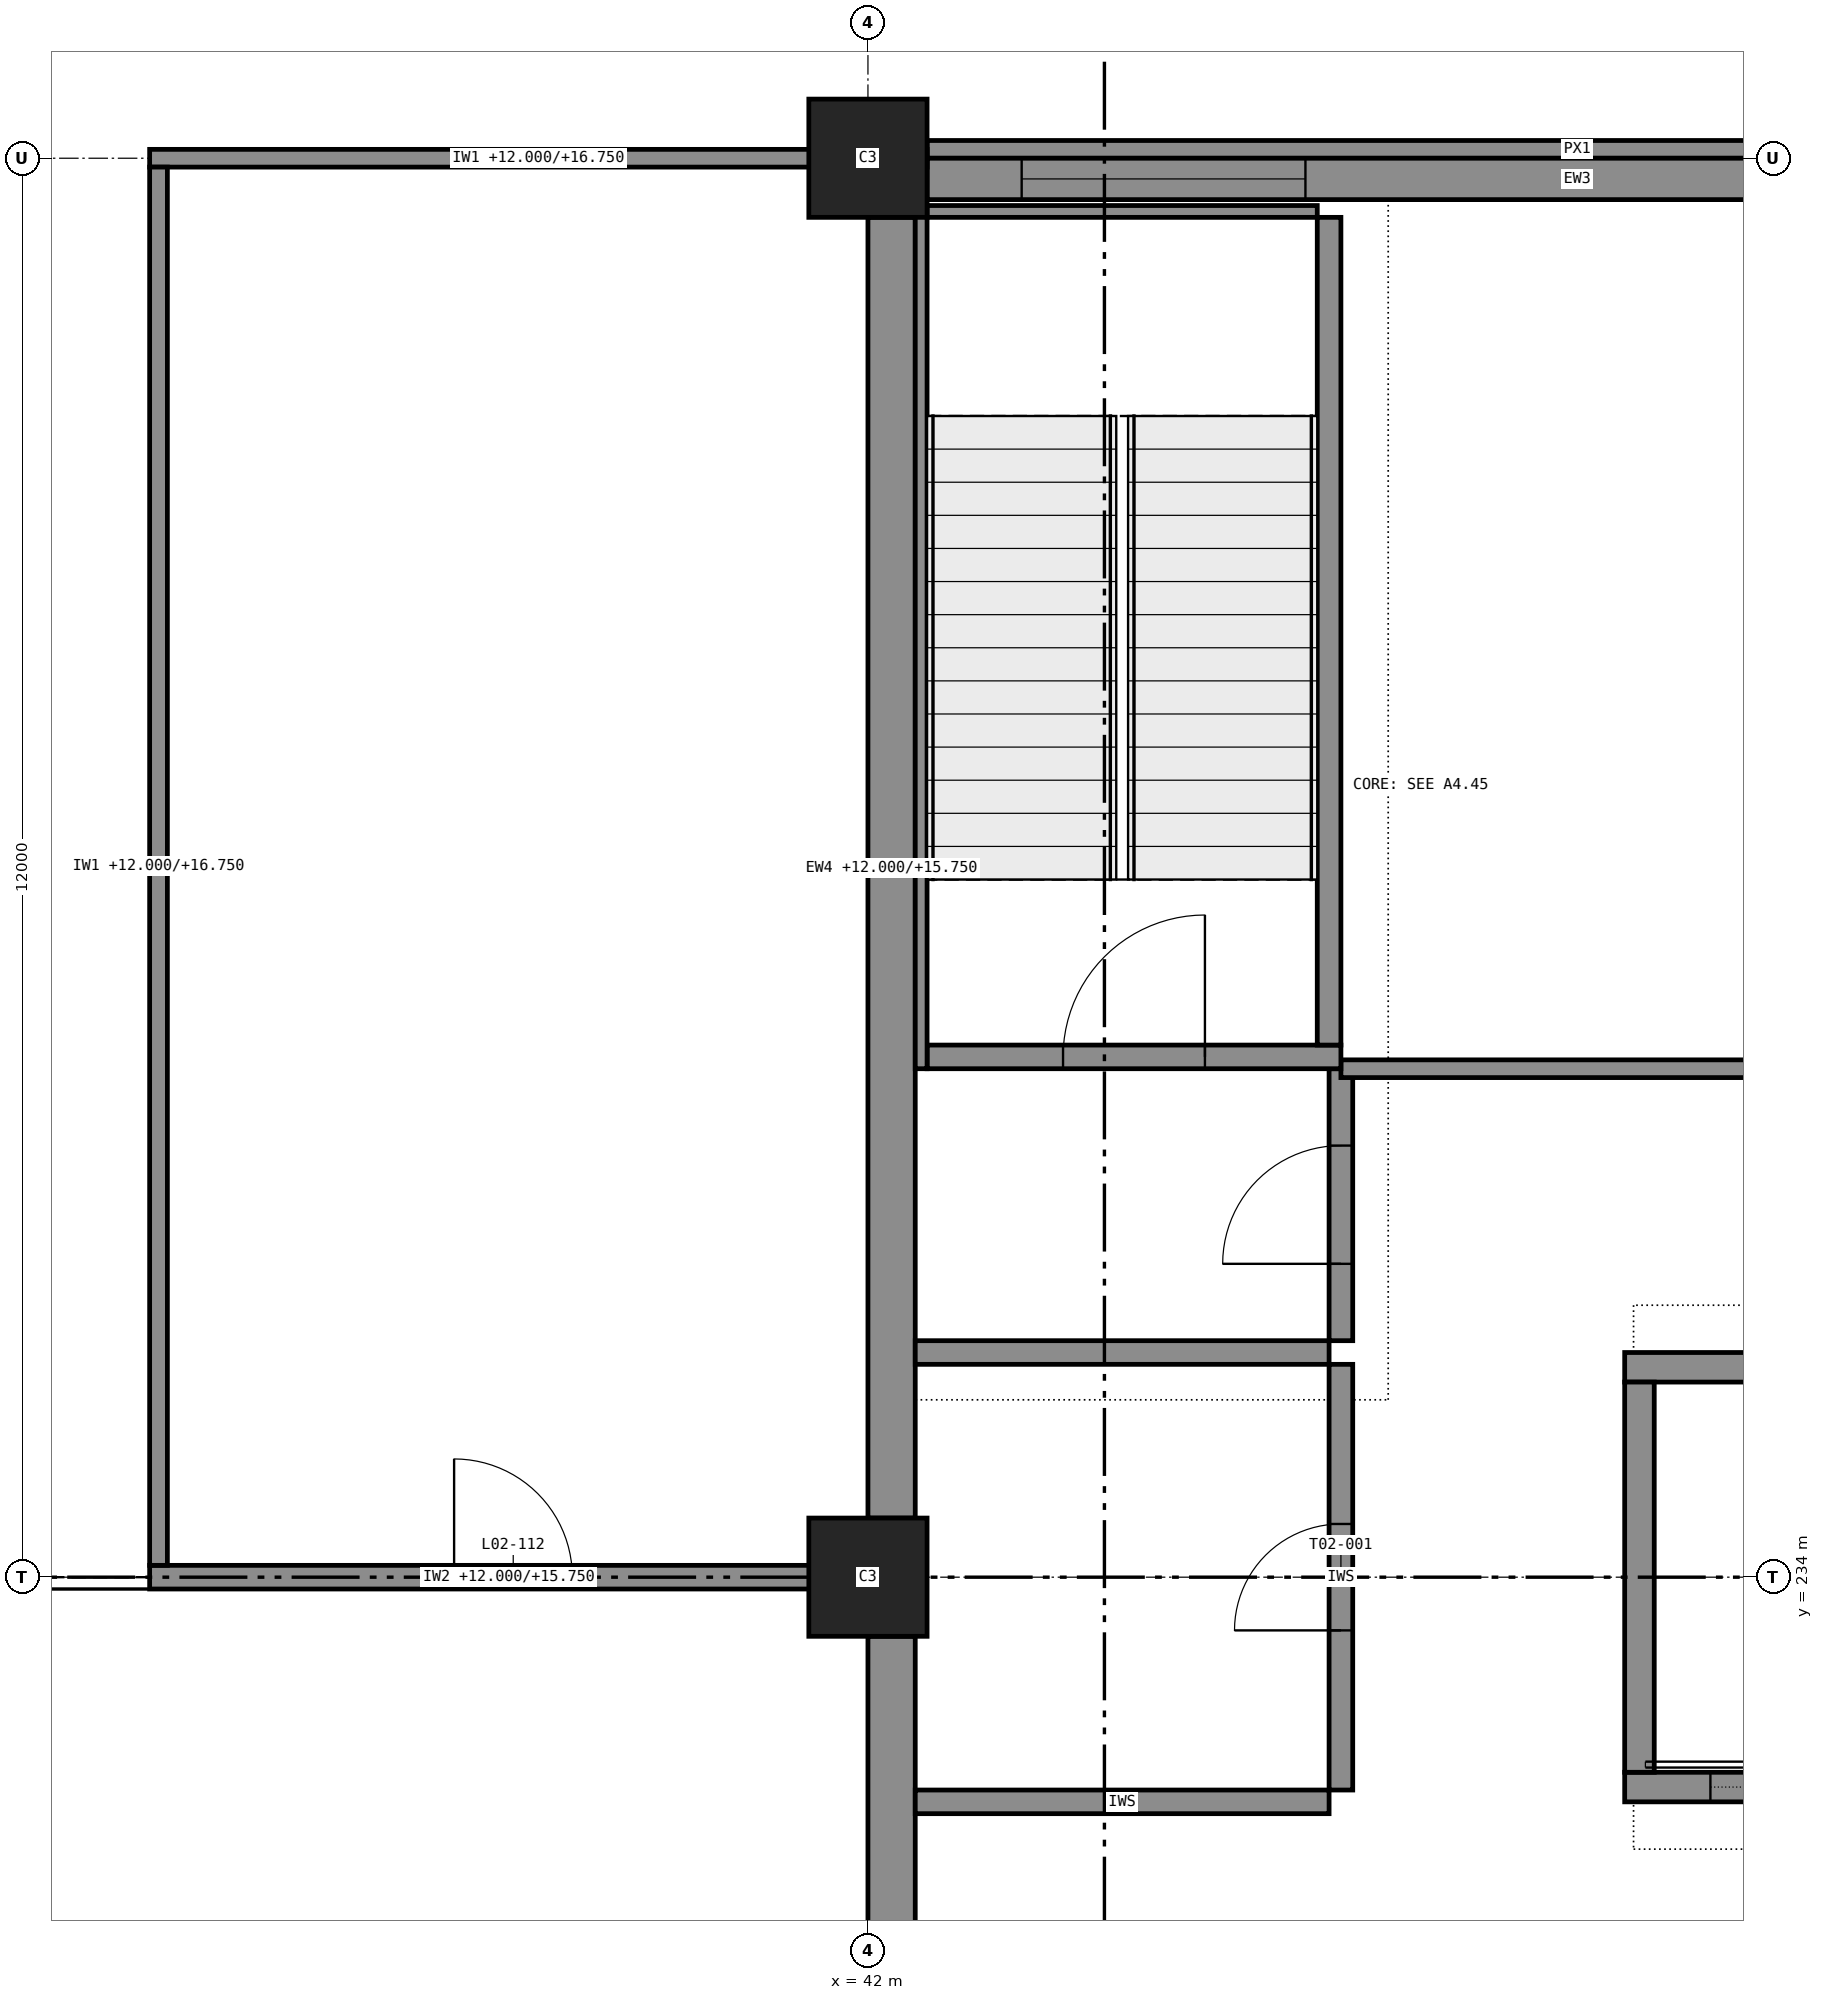
"""IFC4 building model, lengths in metres.
Left out: names, types, materials, properties, quantities, classifications, styles, units other than length and angle.
Written with IfcOpenShell. Run it as: python <this file> out.ifc"""

import sys

from ifc_helpers import new_model, si_unit, direction, frame, frame_2d, origin, origin_2d, place, context, subcontext, project, spatial, rectangle, extrude, element, fill, save


model = new_model("IFC4")
c1 = context("Model", 3, precision=1e-05, world=origin(), true_north=direction((0.0, 1.0)))
c2 = subcontext(c1, "Body", "Model", "MODEL_VIEW")
j1 = project(units=[si_unit("LENGTHUNIT", "METRE"), si_unit("PLANEANGLEUNIT", "RADIAN")], contexts=[c1])
p1 = place(None, origin())
s1 = spatial("IfcSite", under=j1, at=p1, CompositionType="ELEMENT")
p2 = place(p1, origin())
s2 = spatial("IfcBuilding", under=s1, at=p2, CompositionType="ELEMENT")
p3 = place(p2, frame((0.0, 0.0, 12.0)))
s3 = spatial("IfcBuildingStorey", under=s2, at=p3, CompositionType="ELEMENT", Elevation=12.0)
for number, where, z_axis, x_axis in (
    (1, (42.0, 234.0, 0.0), (0.0, 0.0, 1.0), (1.0, 0.0, 0.0)),
    (2, (42.0, 246.0, 0.0), (0.0, 0.0, 1.0), (1.0, 0.0, 0.0)),
):
    element("IfcColumn", number, at=place(p3, frame(where, z_axis=z_axis, x_axis=x_axis)), inside=s3, PredefinedType="COLUMN", context=c2, shape_type="SweptSolid", body=[
        extrude(rectangle(XDim=1.0, YDim=1.0, at=origin_2d()), origin(), (0.0, 0.0, 1.0), 5.0),
    ])
p4 = place(p3, frame((48.4, 232.225, 0.0), z_axis=(0.0, 0.0, 1.0), x_axis=(1.0, 0.0, 0.0)))
e3 = element("IfcWall", 3, at=p4, inside=s3, PredefinedType="SHEAR", context=c2, shape_type="SweptSolid", body=[
    extrude(rectangle(XDim=2.55, YDim=0.25, at=frame_2d((1.275, 0.0))), origin(), (0.0, 0.0, 1.0), 5.0),
])
p5 = place(p4, frame((0.725, 0.0, 0.0)))
e4 = element("IfcOpeningElement", 4, at=p5, cuts=e3, PredefinedType="OPENING", context=c2, shape_type="SweptSolid", body=[
    extrude(rectangle(XDim=1.1, YDim=2.1, at=frame_2d((0.55, 1.05))), frame((0.0, 0.135, 0.0), z_axis=(0.0, -1.0, 0.0), x_axis=(1.0, 0.0, 0.0)), (0.0, 0.0, 1.0), 0.27),
])
p6 = place(p3, frame((48.4, 235.775, 0.0), z_axis=(0.0, 0.0, 1.0), x_axis=(1.0, 0.0, 0.0)))
e5 = element("IfcWall", 5, at=p6, inside=s3, PredefinedType="SHEAR", context=c2, shape_type="SweptSolid", body=[
    extrude(rectangle(XDim=2.55, YDim=0.25, at=frame_2d((1.275, 0.0))), origin(), (0.0, 0.0, 1.0), 5.0),
])
p7 = place(p3, frame((48.525, 232.35, 0.0), z_axis=(0.0, 0.0, 1.0), x_axis=(0.0, 1.0, 0.0)))
e6 = element("IfcWall", 6, at=p7, inside=s3, PredefinedType="SHEAR", context=c2, shape_type="SweptSolid", body=[
    extrude(rectangle(XDim=3.3, YDim=0.25, at=frame_2d((1.65, 0.0))), origin(), (0.0, 0.0, 1.0), 5.0),
])
p8 = place(p3, frame((42.5, 238.4, 0.0), z_axis=(0.0, 0.0, 1.0), x_axis=(1.0, 0.0, 0.0)))
e7 = element("IfcWall", 7, at=p8, inside=s3, PredefinedType="SHEAR", context=c2, shape_type="SweptSolid", body=[
    extrude(rectangle(XDim=3.5, YDim=0.2, at=frame_2d((1.75, 0.0))), origin(), (0.0, 0.0, 1.0), 5.0),
])
p9 = place(p8, frame((1.15, 0.0, 0.0)))
e8 = element("IfcOpeningElement", 8, at=p9, cuts=e7, PredefinedType="OPENING", context=c2, shape_type="SweptSolid", body=[
    extrude(rectangle(XDim=1.2, YDim=2.1, at=frame_2d((0.6, 1.05))), frame((0.0, 0.11, 0.0), z_axis=(0.0, -1.0, 0.0), x_axis=(1.0, 0.0, 0.0)), (0.0, 0.0, 1.0), 0.22),
])
p10 = place(p3, frame((45.9, 238.5, 0.0), z_axis=(0.0, 0.0, 1.0), x_axis=(0.0, 1.0, 0.0)))
e9 = element("IfcWall", 9, at=p10, inside=s3, PredefinedType="SHEAR", context=c2, shape_type="SweptSolid", body=[
    extrude(rectangle(XDim=7.0, YDim=0.2, at=frame_2d((3.5, 0.0))), origin(), (0.0, 0.0, 1.0), 5.0),
])
p11 = place(p3, frame((42.45, 238.3, 0.0), z_axis=(0.0, 0.0, 1.0), x_axis=(0.0, 1.0, 0.0)))
e10 = element("IfcWall", 10, at=p11, inside=s3, PredefinedType="SHEAR", context=c2, shape_type="SweptSolid", body=[
    extrude(rectangle(XDim=7.3, YDim=0.1, at=frame_2d((3.65, 0.0))), origin(), (0.0, 0.0, 1.0), 4.75),
])
p12 = place(p3, frame((42.5, 245.55, 0.0), z_axis=(0.0, 0.0, 1.0), x_axis=(1.0, 0.0, 0.0)))
e11 = element("IfcWall", 11, at=p12, inside=s3, PredefinedType="SHEAR", context=c2, shape_type="SweptSolid", body=[
    extrude(rectangle(XDim=3.3, YDim=0.1, at=frame_2d((1.65, 0.0))), origin(), (0.0, 0.0, 1.0), 4.75),
])
p13 = place(p3, frame((53.5, 245.825, 0.0), z_axis=(0.0, 0.0, 1.0), x_axis=(-1.0, 0.0, 0.0)))
e12 = element("IfcWall", 12, at=p13, inside=s3, PredefinedType="STANDARD", context=c2, shape_type="SweptSolid", body=[
    extrude(rectangle(XDim=11.0, YDim=0.35, at=frame_2d((5.5, 0.0))), origin(), (0.0, 0.0, 1.0), 3.75),
])
p14 = place(p13, frame((1.3, 0.0, 0.6)))
e13 = element("IfcOpeningElement", 13, at=p14, cuts=e12, PredefinedType="OPENING", context=c2, shape_type="SweptSolid", body=[
    extrude(rectangle(XDim=2.4, YDim=2.4, at=frame_2d((1.2, 1.2))), frame((0.0, 0.185, 0.0), z_axis=(0.0, -1.0, 0.0), x_axis=(1.0, 0.0, 0.0)), (0.0, 0.0, 1.0), 0.37),
])
p15 = place(p13, frame((7.8, 0.0, 0.6)))
e14 = element("IfcOpeningElement", 14, at=p15, cuts=e12, PredefinedType="OPENING", context=c2, shape_type="SweptSolid", body=[
    extrude(rectangle(XDim=2.4, YDim=2.4, at=frame_2d((1.2, 1.2))), frame((0.0, 0.185, 0.0), z_axis=(0.0, -1.0, 0.0), x_axis=(1.0, 0.0, 0.0)), (0.0, 0.0, 1.0), 0.37),
])
p16 = place(p3, frame((53.5, 246.075, 4.75), z_axis=(0.0, 0.0, 1.0), x_axis=(-1.0, 0.0, 0.0)))
e15 = element("IfcWall", 15, at=p16, inside=s3, PredefinedType="STANDARD", context=c2, shape_type="SweptSolid", body=[
    extrude(rectangle(XDim=11.0, YDim=0.15, at=frame_2d((5.5, 0.0))), origin(), (0.0, 0.0, 1.0), 0.25),
])
for number, where, z_axis, x_axis in (
    (16, (42.2, 245.5, 0.0), (0.0, 0.0, 1.0), (0.0, -1.0, 0.0)),
    (17, (42.2, 233.5, 0.0), (0.0, 0.0, 1.0), (0.0, -1.0, 0.0)),
):
    element("IfcWall", number, at=place(p3, frame(where, z_axis=z_axis, x_axis=x_axis)), inside=s3, PredefinedType="SOLIDWALL", context=c2, shape_type="SweptSolid", body=[
        extrude(rectangle(XDim=11.0, YDim=0.4, at=frame_2d((5.5, 0.0))), origin(), (0.0, 0.0, 1.0), 3.75),
    ])
p17 = place(p3, frame((35.925, 234.0, 0.0), z_axis=(0.0, 0.0, 1.0), x_axis=(1.0, 0.0, 0.0)))
e18 = element("IfcWall", 18, at=p17, inside=s3, PredefinedType="PARTITIONING", context=c2, shape_type="SweptSolid", body=[
    extrude(rectangle(XDim=6.075, YDim=0.2, at=frame_2d((3.038, 0.0))), origin(), (0.0, 0.0, 1.0), 3.75),
])
p18 = place(p17, frame((2.575, 0.0, 0.0)))
e19 = element("IfcOpeningElement", 19, at=p18, cuts=e18, PredefinedType="OPENING", context=c2, shape_type="SweptSolid", body=[
    extrude(rectangle(XDim=1.0, YDim=2.1, at=frame_2d((0.5, 1.05))), frame((0.0, 0.11, 0.0), z_axis=(0.0, -1.0, 0.0), x_axis=(1.0, 0.0, 0.0)), (0.0, 0.0, 1.0), 0.22),
])
p19 = place(p3, frame((35.925, 246.0, 0.0), z_axis=(0.0, 0.0, 1.0), x_axis=(1.0, 0.0, 0.0)))
e20 = element("IfcWall", 20, at=p19, inside=s3, PredefinedType="PARTITIONING", context=c2, shape_type="SweptSolid", body=[
    extrude(rectangle(XDim=6.575, YDim=0.15, at=frame_2d((3.288, 0.0))), origin(), (0.0, 0.0, 1.0), 4.75),
])
p20 = place(p3, frame((36.0, 234.1, 0.0), z_axis=(0.0, 0.0, 1.0), x_axis=(0.0, 1.0, 0.0)))
e21 = element("IfcWall", 21, at=p20, inside=s3, PredefinedType="PARTITIONING", context=c2, shape_type="SweptSolid", body=[
    extrude(rectangle(XDim=11.825, YDim=0.15, at=frame_2d((5.913, 0.0))), origin(), (0.0, 0.0, 1.0), 4.75),
])
for number, where, z_axis, x_axis in (
    (22, (42.4, 232.1, 0.0), (0.0, 0.0, 1.0), (1.0, 0.0, 0.0)),
    (23, (42.4, 235.9, 0.0), (0.0, 0.0, 1.0), (1.0, 0.0, 0.0)),
):
    element("IfcWall", number, at=place(p3, frame(where, z_axis=z_axis, x_axis=x_axis)), inside=s3, PredefinedType="PARTITIONING", context=c2, shape_type="SweptSolid", body=[
        extrude(rectangle(XDim=3.5, YDim=0.2, at=frame_2d((1.75, 0.0))), origin(), (0.0, 0.0, 1.0), 4.75),
    ])
p21 = place(p3, frame((46.0, 232.2, 0.0), z_axis=(0.0, 0.0, 1.0), x_axis=(0.0, 1.0, 0.0)))
e24 = element("IfcWall", 24, at=p21, inside=s3, PredefinedType="PARTITIONING", context=c2, shape_type="SweptSolid", body=[
    extrude(rectangle(XDim=3.6, YDim=0.2, at=frame_2d((1.8, 0.0))), origin(), (0.0, 0.0, 1.0), 4.75),
])
p22 = place(p21, frame((1.35, 0.0, 0.0)))
e25 = element("IfcOpeningElement", 25, at=p22, cuts=e24, PredefinedType="OPENING", context=c2, shape_type="SweptSolid", body=[
    extrude(rectangle(XDim=0.9, YDim=2.1, at=frame_2d((0.45, 1.05))), frame((0.0, 0.11, 0.0), z_axis=(0.0, -1.0, 0.0), x_axis=(1.0, 0.0, 0.0)), (0.0, 0.0, 1.0), 0.22),
])
p23 = place(p3, frame((46.0, 236.0, 0.0), z_axis=(0.0, 0.0, 1.0), x_axis=(0.0, 1.0, 0.0)))
e26 = element("IfcWall", 26, at=p23, inside=s3, PredefinedType="PARTITIONING", context=c2, shape_type="SweptSolid", body=[
    extrude(rectangle(XDim=2.3, YDim=0.2, at=frame_2d((1.15, 0.0))), origin(), (0.0, 0.0, 1.0), 4.75),
])
p24 = place(p23, frame((0.65, 0.0, 0.0)))
e27 = element("IfcOpeningElement", 27, at=p24, cuts=e26, PredefinedType="OPENING", context=c2, shape_type="SweptSolid", body=[
    extrude(rectangle(XDim=1.0, YDim=2.1, at=frame_2d((0.5, 1.05))), frame((0.0, 0.11, 0.0), z_axis=(0.0, -1.0, 0.0), x_axis=(1.0, 0.0, 0.0)), (0.0, 0.0, 1.0), 0.22),
])
p25 = place(p3, frame((46.0, 238.3, 0.0), z_axis=(0.0, 0.0, 1.0), x_axis=(1.0, 0.0, 0.0)))
e28 = element("IfcWall", 28, at=p25, inside=s3, PredefinedType="PARTITIONING", context=c2, shape_type="SweptSolid", body=[
    extrude(rectangle(XDim=8.1, YDim=0.15, at=frame_2d((4.05, 0.0))), origin(), (0.0, 0.0, 1.0), 4.75),
])
p26 = place(p25, frame((3.5, 0.0, 0.0)))
e29 = element("IfcOpeningElement", 29, at=p26, cuts=e28, PredefinedType="OPENING", context=c2, shape_type="SweptSolid", body=[
    extrude(rectangle(XDim=1.0, YDim=2.1, at=frame_2d((0.5, 1.05))), frame((0.0, 0.085, 0.0), z_axis=(0.0, -1.0, 0.0), x_axis=(1.0, 0.0, 0.0)), (0.0, 0.0, 1.0), 0.17),
])
p27 = place(p15, origin())
e30 = element("IfcWindow", 30, at=p27, inside=s3, PartitioningType="SINGLE_PANEL", PredefinedType="WINDOW", context=c2, shape_type="SweptSolid", body=[
    extrude(rectangle(XDim=2.4, YDim=2.4, at=frame_2d((1.2, 1.2))), frame((0.0, 0.03, 0.0), z_axis=(0.0, -1.0, 0.0), x_axis=(1.0, 0.0, 0.0)), (0.0, 0.0, 1.0), 0.06),
])
fill(e14, e30)
p28 = place(p18, origin())
e31 = element("IfcDoor", 31, at=p28, inside=s3, OperationType="SINGLE_SWING_RIGHT", PredefinedType="DOOR", context=c2, shape_type="SweptSolid", body=[
    extrude(rectangle(XDim=1.0, YDim=2.1, at=frame_2d((0.5, 1.05))), frame((0.0, 0.025, 0.0), z_axis=(0.0, -1.0, 0.0), x_axis=(1.0, 0.0, 0.0)), (0.0, 0.0, 1.0), 0.05),
])
fill(e19, e31)
p29 = place(p22, origin())
e32 = element("IfcDoor", 32, at=p29, inside=s3, OperationType="SINGLE_SWING_LEFT", PredefinedType="DOOR", context=c2, shape_type="SweptSolid", body=[
    extrude(rectangle(XDim=0.9, YDim=2.1, at=frame_2d((0.45, 1.05))), frame((0.0, 0.025, 0.0), z_axis=(0.0, -1.0, 0.0), x_axis=(1.0, 0.0, 0.0)), (0.0, 0.0, 1.0), 0.05),
])
fill(e25, e32)
p30 = place(p24, origin())
e33 = element("IfcDoor", 33, at=p30, inside=s3, OperationType="SINGLE_SWING_LEFT", PredefinedType="DOOR", context=c2, shape_type="SweptSolid", body=[
    extrude(rectangle(XDim=1.0, YDim=2.1, at=frame_2d((0.5, 1.05))), frame((0.0, 0.025, 0.0), z_axis=(0.0, -1.0, 0.0), x_axis=(1.0, 0.0, 0.0)), (0.0, 0.0, 1.0), 0.05),
])
fill(e27, e33)
p31 = place(p5, origin())
e34 = element("IfcDoor", 34, at=p31, inside=s3, OperationType="SLIDING_TO_LEFT", PredefinedType="DOOR", context=c2, shape_type="SweptSolid", body=[
    extrude(rectangle(XDim=1.1, YDim=2.1, at=frame_2d((0.55, 1.05))), frame((0.0, 0.025, 0.0), z_axis=(0.0, -1.0, 0.0), x_axis=(1.0, 0.0, 0.0)), (0.0, 0.0, 1.0), 0.05),
])
fill(e4, e34)
p32 = place(p9, origin())
e35 = element("IfcDoor", 35, at=p32, inside=s3, OperationType="SINGLE_SWING_RIGHT", PredefinedType="DOOR", context=c2, shape_type="SweptSolid", body=[
    extrude(rectangle(XDim=1.2, YDim=2.1, at=frame_2d((0.6, 1.05))), frame((0.0, 0.025, 0.0), z_axis=(0.0, -1.0, 0.0), x_axis=(1.0, 0.0, 0.0)), (0.0, 0.0, 1.0), 0.05),
])
fill(e8, e35)
save(model, sys.argv[1])
